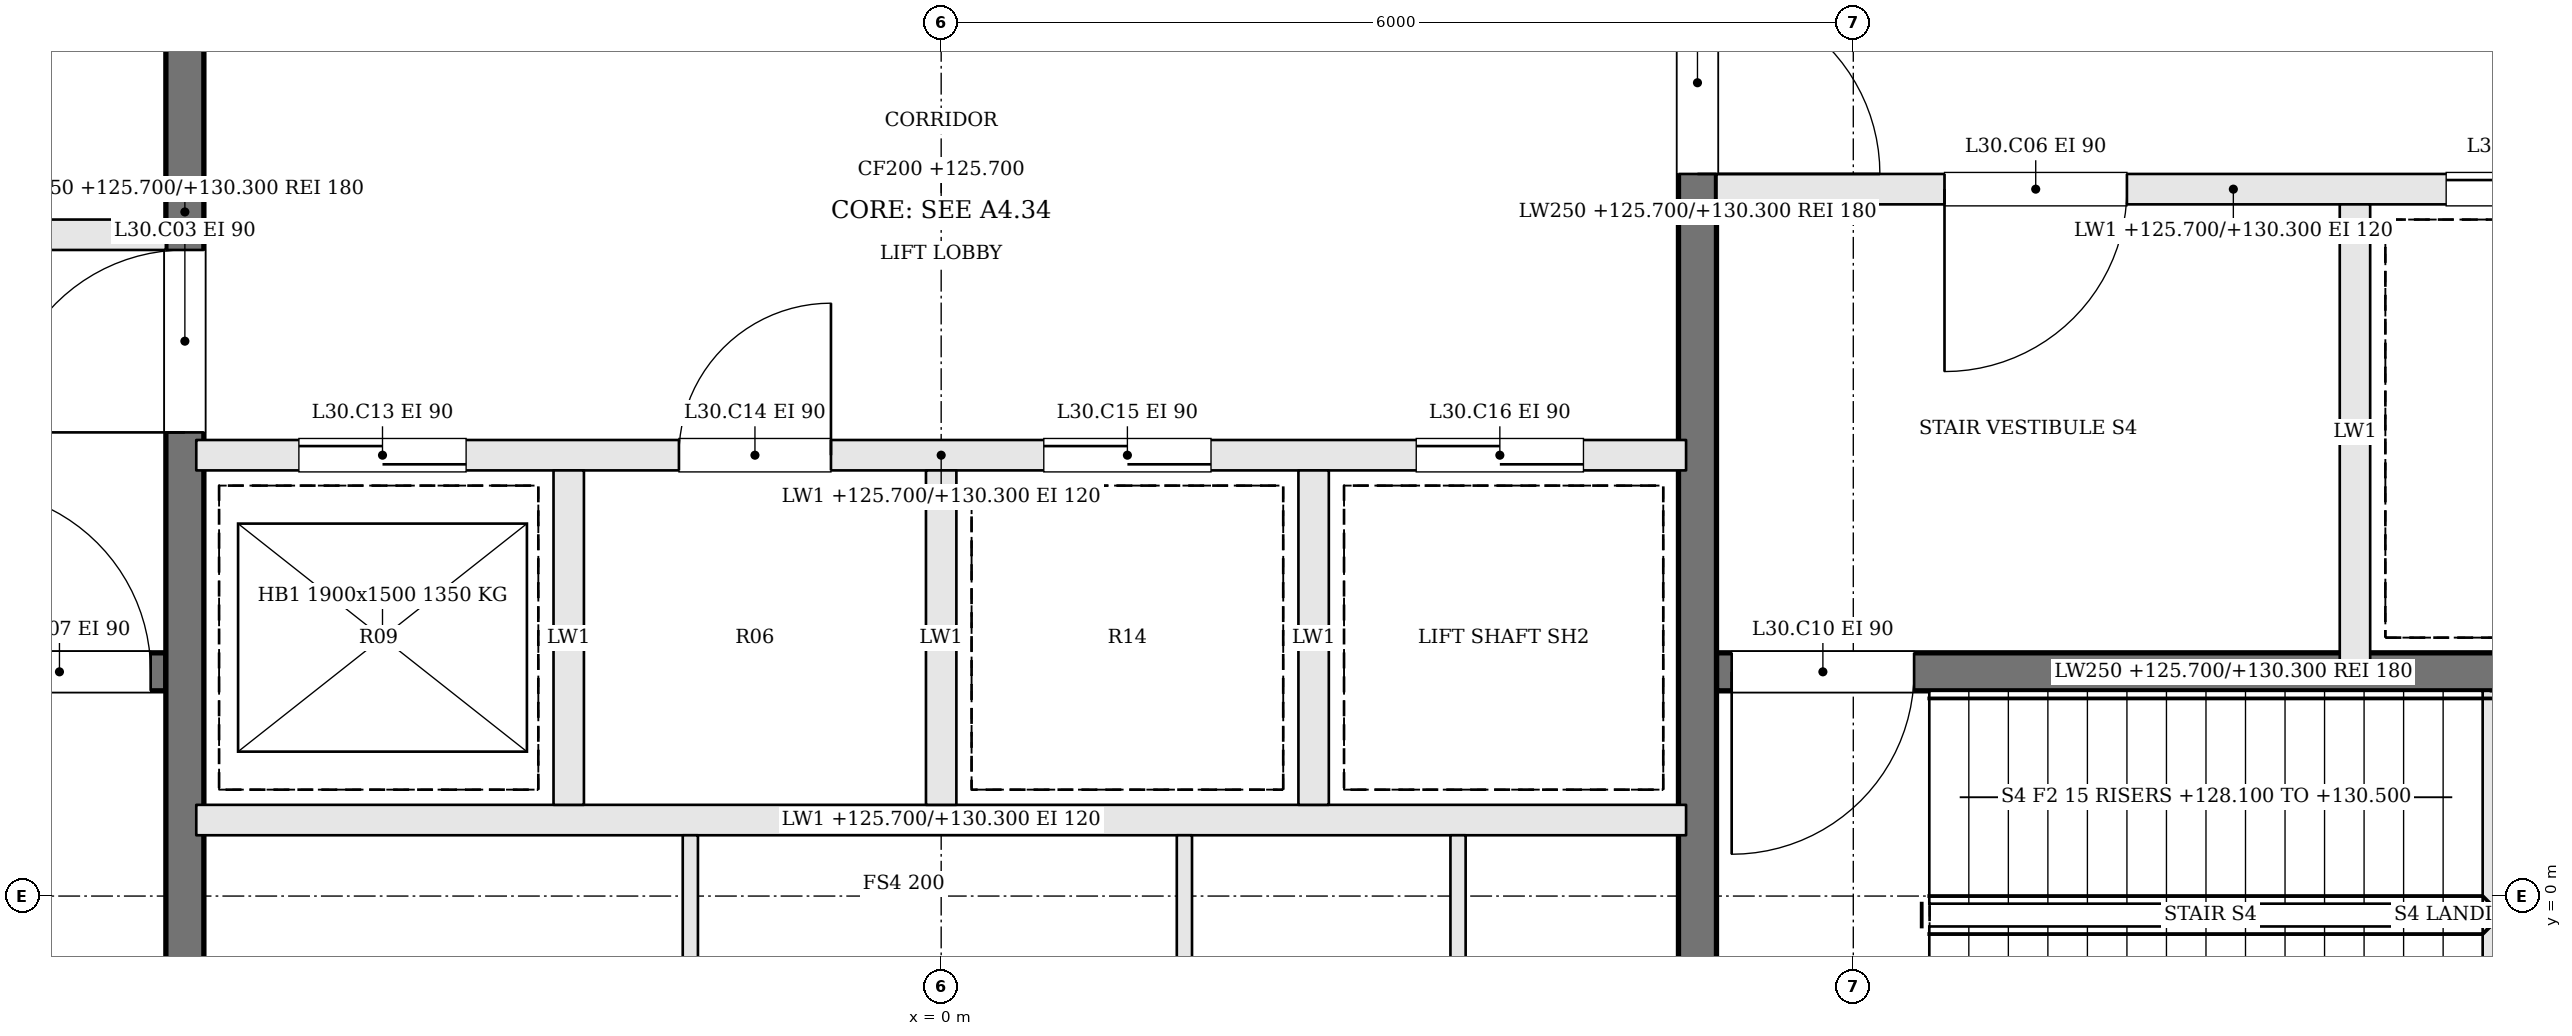
"""IFC4 building model, lengths in metres.
Left out: names, types, materials, properties, quantities, classifications, styles, units other than length and angle.
Written with IfcOpenShell. Run it as: python <this file> out.ifc"""

import sys

from ifc_helpers import new_model, si_unit, direction, frame, frame_2d, origin, place, context, subcontext, project, spatial, rectangle, extrude, element, fill, save


model = new_model("IFC4")
c1 = context("Model", 3, precision=1e-05, world=origin(), true_north=direction((0.0, 1.0)))
c2 = subcontext(c1, "Body", "Model", "MODEL_VIEW")
j1 = project(units=[si_unit("LENGTHUNIT", "METRE"), si_unit("PLANEANGLEUNIT", "RADIAN")], contexts=[c1])
p1 = place(None, origin())
s1 = spatial("IfcSite", under=j1, at=p1, CompositionType="ELEMENT")
p2 = place(p1, origin())
s2 = spatial("IfcBuilding", under=s1, at=p2, CompositionType="ELEMENT")
p3 = place(p2, frame((0.0, 0.0, 125.7)))
s3 = spatial("IfcBuildingStorey", under=s2, at=p3, CompositionType="ELEMENT", Elevation=125.7)
p4 = place(p3, frame((-11.9, 1.475, 0.0), z_axis=(0.0, 0.0, 1.0), x_axis=(1.0, 0.0, 0.0)))
e1 = element("IfcWall", 1, at=p4, inside=s3, PredefinedType="SOLIDWALL", context=c2, shape_type="SweptSolid", body=[
    extrude(rectangle(XDim=6.8, YDim=0.25, at=frame_2d((3.4, 0.0))), origin(), (0.0, 0.0, 1.0), 4.6),
])
p5 = place(p4, frame((5.5, 0.0, 0.0)))
e2 = element("IfcOpeningElement", 2, at=p5, cuts=e1, PredefinedType="OPENING", context=c2, shape_type="SweptSolid", body=[
    extrude(rectangle(XDim=1.2, YDim=2.1, at=frame_2d((0.6, 1.05))), frame((0.0, 0.135, 0.0), z_axis=(0.0, -1.0, 0.0), x_axis=(1.0, 0.0, 0.0)), (0.0, 0.0, 1.0), 0.27),
])
p6 = place(p3, frame((-11.9, 4.35, 0.0), z_axis=(0.0, 0.0, 1.0), x_axis=(1.0, 0.0, 0.0)))
e3 = element("IfcWall", 3, at=p6, inside=s3, PredefinedType="SOLIDWALL", context=c2, shape_type="SweptSolid", body=[
    extrude(rectangle(XDim=6.8, YDim=0.2, at=frame_2d((3.4, 0.0))), origin(), (0.0, 0.0, 1.0), 4.6),
])
p7 = place(p6, frame((4.1, 0.0, 0.0)))
e4 = element("IfcOpeningElement", 4, at=p7, cuts=e3, PredefinedType="OPENING", context=c2, shape_type="SweptSolid", body=[
    extrude(rectangle(XDim=1.2, YDim=2.1, at=frame_2d((0.6, 1.05))), frame((0.0, 0.11, 0.0), z_axis=(0.0, -1.0, 0.0), x_axis=(1.0, 0.0, 0.0)), (0.0, 0.0, 1.0), 0.22),
])
p8 = place(p6, frame((0.8, 0.0, 0.0)))
e5 = element("IfcOpeningElement", 5, at=p8, cuts=e3, PredefinedType="OPENING", context=c2, shape_type="SweptSolid", body=[
    extrude(rectangle(XDim=1.2, YDim=2.1, at=frame_2d((0.6, 1.05))), frame((0.0, 0.11, 0.0), z_axis=(0.0, -1.0, 0.0), x_axis=(1.0, 0.0, 0.0)), (0.0, 0.0, 1.0), 0.22),
])
p9 = place(p3, frame((11.9, 4.65, 0.0), z_axis=(0.0, 0.0, 1.0), x_axis=(-1.0, 0.0, 0.0)))
e6 = element("IfcWall", 6, at=p9, inside=s3, PredefinedType="SOLIDWALL", context=c2, shape_type="SweptSolid", body=[
    extrude(rectangle(XDim=6.8, YDim=0.2, at=frame_2d((3.4, 0.0))), origin(), (0.0, 0.0, 1.0), 4.6),
])
p10 = place(p9, frame((4.1, 0.0, 0.0)))
e7 = element("IfcOpeningElement", 7, at=p10, cuts=e6, PredefinedType="OPENING", context=c2, shape_type="SweptSolid", body=[
    extrude(rectangle(XDim=1.2, YDim=2.1, at=frame_2d((0.6, 1.05))), frame((0.0, 0.11, 0.0), z_axis=(0.0, -1.0, 0.0), x_axis=(1.0, 0.0, 0.0)), (0.0, 0.0, 1.0), 0.22),
])
p11 = place(p9, frame((0.8, 0.0, 0.0)))
e8 = element("IfcOpeningElement", 8, at=p11, cuts=e6, PredefinedType="OPENING", context=c2, shape_type="SweptSolid", body=[
    extrude(rectangle(XDim=1.2, YDim=2.1, at=frame_2d((0.6, 1.05))), frame((0.0, 0.11, 0.0), z_axis=(0.0, -1.0, 0.0), x_axis=(1.0, 0.0, 0.0)), (0.0, 0.0, 1.0), 0.22),
])
p12 = place(p3, frame((11.9, 1.475, 0.0), z_axis=(0.0, 0.0, 1.0), x_axis=(-1.0, 0.0, 0.0)))
e9 = element("IfcWall", 9, at=p12, inside=s3, PredefinedType="SOLIDWALL", context=c2, shape_type="SweptSolid", body=[
    extrude(rectangle(XDim=6.8, YDim=0.25, at=frame_2d((3.4, 0.0))), origin(), (0.0, 0.0, 1.0), 4.6),
])
p13 = place(p12, frame((5.5, 0.0, 0.0)))
e10 = element("IfcOpeningElement", 10, at=p13, cuts=e9, PredefinedType="OPENING", context=c2, shape_type="SweptSolid", body=[
    extrude(rectangle(XDim=1.2, YDim=2.1, at=frame_2d((0.6, 1.05))), frame((0.0, 0.135, 0.0), z_axis=(0.0, -1.0, 0.0), x_axis=(1.0, 0.0, 0.0)), (0.0, 0.0, 1.0), 0.27),
])
p14 = place(p3, frame((9.3, 4.55, 0.0), z_axis=(0.0, 0.0, 1.0), x_axis=(0.0, -1.0, 0.0)))
e11 = element("IfcWall", 11, at=p14, inside=s3, PredefinedType="SOLIDWALL", context=c2, shape_type="SweptSolid", body=[
    extrude(rectangle(XDim=3.0, YDim=0.2, at=frame_2d((1.5, 0.0))), origin(), (0.0, 0.0, 1.0), 4.6),
])
p15 = place(p3, frame((-4.975, -1.9, 0.0), z_axis=(0.0, 0.0, 1.0), x_axis=(0.0, 1.0, 0.0)))
e12 = element("IfcWall", 12, at=p15, inside=s3, PredefinedType="SOLIDWALL", context=c2, shape_type="SweptSolid", body=[
    extrude(rectangle(XDim=12.8, YDim=0.25, at=frame_2d((6.4, 0.0))), origin(), (0.0, 0.0, 1.0), 4.6),
])
p16 = place(p15, frame((4.95, 0.0, 0.0)))
e13 = element("IfcOpeningElement", 13, at=p16, cuts=e12, PredefinedType="OPENING", context=c2, shape_type="SweptSolid", body=[
    extrude(rectangle(XDim=1.2, YDim=2.1, at=frame_2d((0.6, 1.05))), frame((0.0, 0.135, 0.0), z_axis=(0.0, -1.0, 0.0), x_axis=(1.0, 0.0, 0.0)), (0.0, 0.0, 1.0), 0.27),
])
p17 = place(p3, frame((4.975, 10.9, 0.0), z_axis=(0.0, 0.0, 1.0), x_axis=(0.0, -1.0, 0.0)))
e14 = element("IfcWall", 14, at=p17, inside=s3, PredefinedType="SOLIDWALL", context=c2, shape_type="SweptSolid", body=[
    extrude(rectangle(XDim=12.8, YDim=0.25, at=frame_2d((6.4, 0.0))), origin(), (0.0, 0.0, 1.0), 4.6),
])
p18 = place(p17, frame((4.95, 0.0, 0.0)))
e15 = element("IfcOpeningElement", 15, at=p18, cuts=e14, PredefinedType="OPENING", context=c2, shape_type="SweptSolid", body=[
    extrude(rectangle(XDim=1.2, YDim=2.1, at=frame_2d((0.6, 1.05))), frame((0.0, 0.135, 0.0), z_axis=(0.0, -1.0, 0.0), x_axis=(1.0, 0.0, 0.0)), (0.0, 0.0, 1.0), 0.27),
])
p19 = place(p3, frame((-4.9, 0.5, 0.0), z_axis=(0.0, 0.0, 1.0), x_axis=(1.0, 0.0, 0.0)))
e16 = element("IfcWall", 16, at=p19, inside=s3, PredefinedType="SOLIDWALL", context=c2, shape_type="SweptSolid", body=[
    extrude(rectangle(XDim=9.8, YDim=0.2, at=frame_2d((4.9, 0.0))), origin(), (0.0, 0.0, 1.0), 4.6),
])
p20 = place(p3, frame((-4.9, 2.9, 0.0), z_axis=(0.0, 0.0, 1.0), x_axis=(1.0, 0.0, 0.0)))
e17 = element("IfcWall", 17, at=p20, inside=s3, PredefinedType="SOLIDWALL", context=c2, shape_type="SweptSolid", body=[
    extrude(rectangle(XDim=9.8, YDim=0.2, at=frame_2d((4.9, 0.0))), origin(), (0.0, 0.0, 1.0), 4.6),
])
p21 = place(p20, frame((0.675, 0.0, 0.0)))
e18 = element("IfcOpeningElement", 18, at=p21, cuts=e17, PredefinedType="OPENING", context=c2, shape_type="SweptSolid", body=[
    extrude(rectangle(XDim=1.1, YDim=2.1, at=frame_2d((0.55, 1.05))), frame((0.0, 0.11, 0.0), z_axis=(0.0, -1.0, 0.0), x_axis=(1.0, 0.0, 0.0)), (0.0, 0.0, 1.0), 0.22),
])
p22 = place(p20, frame((3.175, 0.0, 0.0)))
e19 = element("IfcOpeningElement", 19, at=p22, cuts=e17, PredefinedType="OPENING", context=c2, shape_type="SweptSolid", body=[
    extrude(rectangle(XDim=1.0, YDim=2.1, at=frame_2d((0.5, 1.05))), frame((0.0, 0.11, 0.0), z_axis=(0.0, -1.0, 0.0), x_axis=(1.0, 0.0, 0.0)), (0.0, 0.0, 1.0), 0.22),
])
p23 = place(p20, frame((5.575, 0.0, 0.0)))
e20 = element("IfcOpeningElement", 20, at=p23, cuts=e17, PredefinedType="OPENING", context=c2, shape_type="SweptSolid", body=[
    extrude(rectangle(XDim=1.1, YDim=2.1, at=frame_2d((0.55, 1.05))), frame((0.0, 0.11, 0.0), z_axis=(0.0, -1.0, 0.0), x_axis=(1.0, 0.0, 0.0)), (0.0, 0.0, 1.0), 0.22),
])
p24 = place(p20, frame((8.025, 0.0, 0.0)))
e21 = element("IfcOpeningElement", 21, at=p24, cuts=e17, PredefinedType="OPENING", context=c2, shape_type="SweptSolid", body=[
    extrude(rectangle(XDim=1.1, YDim=2.1, at=frame_2d((0.55, 1.05))), frame((0.0, 0.11, 0.0), z_axis=(0.0, -1.0, 0.0), x_axis=(1.0, 0.0, 0.0)), (0.0, 0.0, 1.0), 0.22),
])
for number, where, z_axis, x_axis in (
    (22, (-2.45, 0.6, 0.0), (0.0, 0.0, 1.0), (0.0, 1.0, 0.0)),
    (23, (0.0, 0.6, 0.0), (0.0, 0.0, 1.0), (0.0, 1.0, 0.0)),
    (24, (2.45, 0.6, 0.0), (0.0, 0.0, 1.0), (0.0, 1.0, 0.0)),
):
    element("IfcWall", number, at=place(p3, frame(where, z_axis=z_axis, x_axis=x_axis)), inside=s3, PredefinedType="SOLIDWALL", context=c2, shape_type="SweptSolid", body=[
        extrude(rectangle(XDim=2.2, YDim=0.2, at=frame_2d((1.1, 0.0))), origin(), (0.0, 0.0, 1.0), 4.6),
    ])
for number, where, z_axis, x_axis in (
    (25, (-1.65, -1.9, 0.0), (0.0, 0.0, 1.0), (0.0, 1.0, 0.0)),
    (26, (1.6, -1.9, 0.0), (0.0, 0.0, 1.0), (0.0, 1.0, 0.0)),
    (27, (3.4, -1.9, 0.0), (0.0, 0.0, 1.0), (0.0, 1.0, 0.0)),
):
    element("IfcWall", number, at=place(p3, frame(where, z_axis=z_axis, x_axis=x_axis)), inside=s3, PredefinedType="PARTITIONING", context=c2, shape_type="SweptSolid", body=[
        extrude(rectangle(XDim=2.3, YDim=0.1, at=frame_2d((1.15, 0.0))), origin(), (0.0, 0.0, 1.0), 4.6),
    ])
p25 = place(p16, origin())
e28 = element("IfcDoor", 28, at=p25, inside=s3, OperationType="SINGLE_SWING_LEFT", PredefinedType="DOOR", context=c2, shape_type="SweptSolid", body=[
    extrude(rectangle(XDim=1.2, YDim=2.1, at=frame_2d((0.6, 1.05))), frame((0.0, 0.025, 0.0), z_axis=(0.0, -1.0, 0.0), x_axis=(1.0, 0.0, 0.0)), (0.0, 0.0, 1.0), 0.05),
])
fill(e13, e28)
p26 = place(p18, origin())
e29 = element("IfcDoor", 29, at=p26, inside=s3, OperationType="SINGLE_SWING_RIGHT", PredefinedType="DOOR", context=c2, shape_type="SweptSolid", body=[
    extrude(rectangle(XDim=1.2, YDim=2.1, at=frame_2d((0.6, 1.05))), frame((0.0, 0.025, 0.0), z_axis=(0.0, -1.0, 0.0), x_axis=(1.0, 0.0, 0.0)), (0.0, 0.0, 1.0), 0.05),
])
fill(e15, e29)
p27 = place(p10, origin())
e30 = element("IfcDoor", 30, at=p27, inside=s3, OperationType="SINGLE_SWING_RIGHT", PredefinedType="DOOR", context=c2, shape_type="SweptSolid", body=[
    extrude(rectangle(XDim=1.2, YDim=2.1, at=frame_2d((0.6, 1.05))), frame((0.0, 0.025, 0.0), z_axis=(0.0, -1.0, 0.0), x_axis=(1.0, 0.0, 0.0)), (0.0, 0.0, 1.0), 0.05),
])
fill(e7, e30)
p28 = place(p5, origin())
e31 = element("IfcDoor", 31, at=p28, inside=s3, OperationType="SINGLE_SWING_LEFT", PredefinedType="DOOR", context=c2, shape_type="SweptSolid", body=[
    extrude(rectangle(XDim=1.2, YDim=2.1, at=frame_2d((0.6, 1.05))), frame((0.0, 0.025, 0.0), z_axis=(0.0, -1.0, 0.0), x_axis=(1.0, 0.0, 0.0)), (0.0, 0.0, 1.0), 0.05),
])
fill(e2, e31)
p29 = place(p13, origin())
e32 = element("IfcDoor", 32, at=p29, inside=s3, OperationType="SINGLE_SWING_RIGHT", PredefinedType="DOOR", context=c2, shape_type="SweptSolid", body=[
    extrude(rectangle(XDim=1.2, YDim=2.1, at=frame_2d((0.6, 1.05))), frame((0.0, 0.025, 0.0), z_axis=(0.0, -1.0, 0.0), x_axis=(1.0, 0.0, 0.0)), (0.0, 0.0, 1.0), 0.05),
])
fill(e10, e32)
p30 = place(p11, origin())
e33 = element("IfcDoor", 33, at=p30, inside=s3, OperationType="SLIDING_TO_RIGHT", PredefinedType="DOOR", context=c2, shape_type="SweptSolid", body=[
    extrude(rectangle(XDim=1.2, YDim=2.1, at=frame_2d((0.6, 1.05))), frame((0.0, 0.025, 0.0), z_axis=(0.0, -1.0, 0.0), x_axis=(1.0, 0.0, 0.0)), (0.0, 0.0, 1.0), 0.05),
])
fill(e8, e33)
p31 = place(p21, origin())
e34 = element("IfcDoor", 34, at=p31, inside=s3, OperationType="SLIDING_TO_RIGHT", PredefinedType="DOOR", context=c2, shape_type="SweptSolid", body=[
    extrude(rectangle(XDim=1.1, YDim=2.1, at=frame_2d((0.55, 1.05))), frame((0.0, 0.025, 0.0), z_axis=(0.0, -1.0, 0.0), x_axis=(1.0, 0.0, 0.0)), (0.0, 0.0, 1.0), 0.05),
])
fill(e18, e34)
p32 = place(p22, origin())
e35 = element("IfcDoor", 35, at=p32, inside=s3, OperationType="SINGLE_SWING_RIGHT", PredefinedType="DOOR", context=c2, shape_type="SweptSolid", body=[
    extrude(rectangle(XDim=1.0, YDim=2.1, at=frame_2d((0.5, 1.05))), frame((0.0, 0.025, 0.0), z_axis=(0.0, -1.0, 0.0), x_axis=(1.0, 0.0, 0.0)), (0.0, 0.0, 1.0), 0.05),
])
fill(e19, e35)
p33 = place(p23, origin())
e36 = element("IfcDoor", 36, at=p33, inside=s3, OperationType="SLIDING_TO_LEFT", PredefinedType="DOOR", context=c2, shape_type="SweptSolid", body=[
    extrude(rectangle(XDim=1.1, YDim=2.1, at=frame_2d((0.55, 1.05))), frame((0.0, 0.025, 0.0), z_axis=(0.0, -1.0, 0.0), x_axis=(1.0, 0.0, 0.0)), (0.0, 0.0, 1.0), 0.05),
])
fill(e20, e36)
p34 = place(p24, origin())
e37 = element("IfcDoor", 37, at=p34, inside=s3, OperationType="SLIDING_TO_RIGHT", PredefinedType="DOOR", context=c2, shape_type="SweptSolid", body=[
    extrude(rectangle(XDim=1.1, YDim=2.1, at=frame_2d((0.55, 1.05))), frame((0.0, 0.025, 0.0), z_axis=(0.0, -1.0, 0.0), x_axis=(1.0, 0.0, 0.0)), (0.0, 0.0, 1.0), 0.05),
])
fill(e21, e37)
save(model, sys.argv[1])
